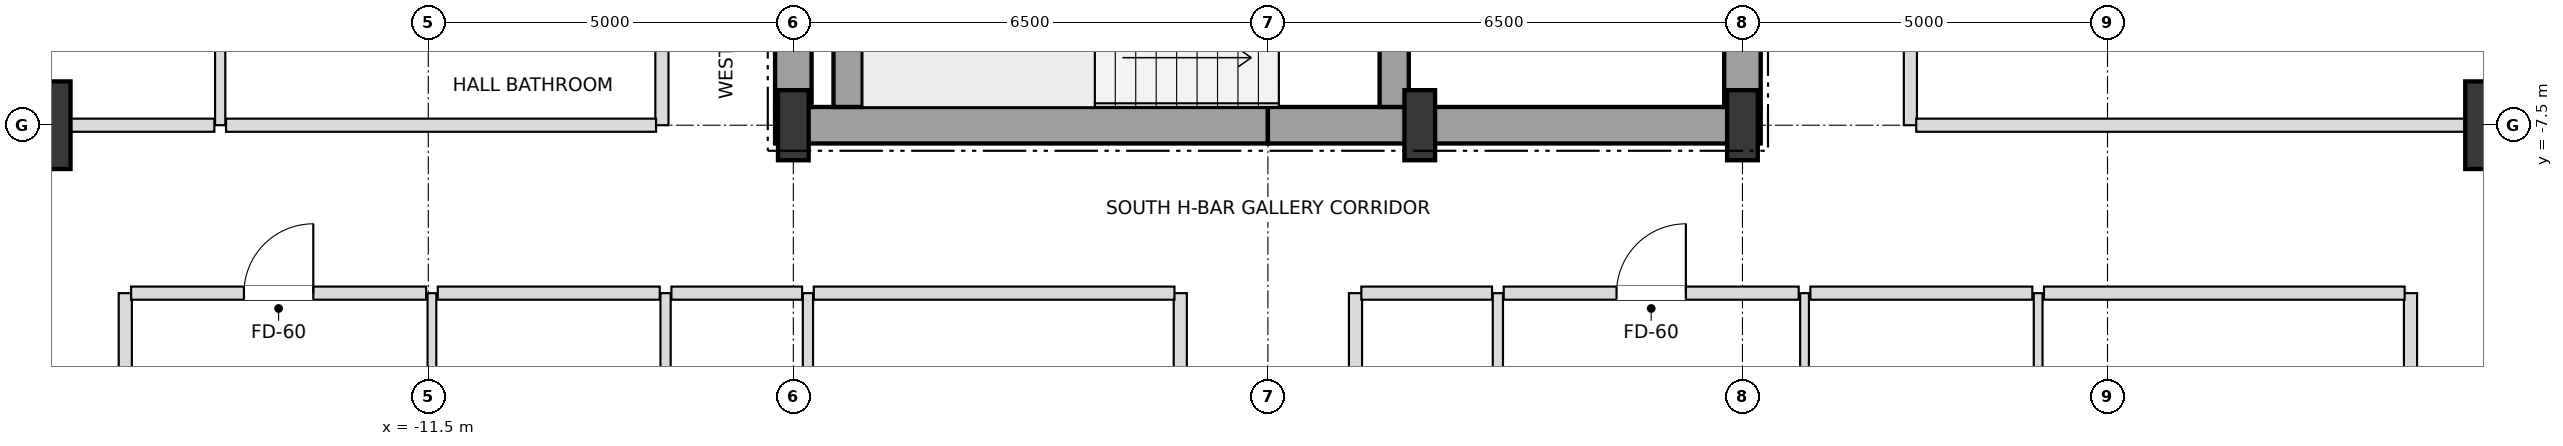
"""IFC4 building model, lengths in metres.
Left out: names, types, materials, properties, quantities, classifications, styles, units other than length and angle.
Written with IfcOpenShell. Run it as: python <this file> out.ifc"""

import sys

from ifc_helpers import new_model, si_unit, direction, frame, frame_2d, origin, origin_2d, place, context, subcontext, project, spatial, rectangle, i_section, extrude, element, fill, save


model = new_model("IFC4")
c1 = context("Model", 3, precision=1e-05, world=origin(), true_north=direction((0.0, 1.0)))
c2 = subcontext(c1, "Body", "Model", "MODEL_VIEW")
j1 = project(units=[si_unit("LENGTHUNIT", "METRE"), si_unit("PLANEANGLEUNIT", "RADIAN")], contexts=[c1])
p1 = place(None, origin())
s1 = spatial("IfcSite", under=j1, at=p1, CompositionType="ELEMENT")
p2 = place(p1, origin())
s2 = spatial("IfcBuilding", under=s1, at=p2, CompositionType="ELEMENT")
p3 = place(p2, frame((0.0, 0.0, 140.4)))
s3 = spatial("IfcBuildingStorey", under=s2, at=p3, CompositionType="ELEMENT", Elevation=140.4)
for number, where, z_axis, x_axis in (
    (1, (-6.5, -7.5, 0.0), (0.0, 0.0, 1.0), (1.0, 0.0, 0.0)),
    (2, (2.08, -7.5, 0.0), (0.0, 0.0, 1.0), (1.0, 0.0, 0.0)),
    (3, (6.5, -7.5, 0.0), (0.0, 0.0, 1.0), (1.0, 0.0, 0.0)),
):
    element("IfcColumn", number, at=place(p3, frame(where, z_axis=z_axis, x_axis=x_axis)), inside=s3, PredefinedType="COLUMN", context=c2, shape_type="SweptSolid", body=[
        extrude(i_section(OverallWidth=0.42, OverallDepth=0.96, WebThickness=0.022, FlangeThickness=0.034, at=origin_2d()), origin(), (0.0, 0.0, 1.0), 3.6),
    ])
for number, where, z_axis, x_axis in (
    (4, (17.0, -7.5, 0.0), (0.0, 0.0, 1.0), (1.0, 0.0, 0.0)),
    (5, (-17.0, -7.5, 0.0), (0.0, 0.0, 1.0), (1.0, 0.0, 0.0)),
):
    element("IfcColumn", number, at=place(p3, frame(where, z_axis=z_axis, x_axis=x_axis)), inside=s3, PredefinedType="USERDEFINED", context=c2, shape_type="SweptSolid", body=[
        extrude(rectangle(XDim=1.2, YDim=1.2, at=origin_2d()), origin(), (0.0, 0.0, 1.0), 3.6),
    ])
for number, where, z_axis, x_axis in (
    (6, (-6.75, -7.5, 0.0), (0.0, 0.0, 1.0), (1.0, 0.0, 0.0)),
    (7, (0.0, -7.5, 0.0), (0.0, 0.0, 1.0), (1.0, 0.0, 0.0)),
):
    element("IfcWall", number, at=place(p3, frame(where, z_axis=z_axis, x_axis=x_axis)), inside=s3, PredefinedType="SHEAR", context=c2, shape_type="SweptSolid", body=[
        extrude(rectangle(XDim=6.75, YDim=0.5, at=frame_2d((3.375, 0.0))), origin(), (0.0, 0.0, 1.0), 3.38),
    ])
p4 = place(p3, frame((-6.5, -7.25, 0.0), z_axis=(0.0, 0.0, 1.0), x_axis=(0.0, 1.0, 0.0)))
e8 = element("IfcWall", 8, at=p4, inside=s3, PredefinedType="SHEAR", context=c2, shape_type="SweptSolid", body=[
    extrude(rectangle(XDim=3.55, YDim=0.5, at=frame_2d((1.775, 0.0))), origin(), (0.0, 0.0, 1.0), 3.38),
])
p5 = place(p3, frame((6.5, -7.25, 0.0), z_axis=(0.0, 0.0, 1.0), x_axis=(0.0, 1.0, 0.0)))
e9 = element("IfcWall", 9, at=p5, inside=s3, PredefinedType="SHEAR", context=c2, shape_type="SweptSolid", body=[
    extrude(rectangle(XDim=5.75, YDim=0.5, at=frame_2d((2.875, 0.0))), origin(), (0.0, 0.0, 1.0), 3.38),
])
p6 = place(p5, frame((0.85, 0.0, 0.0)))
e10 = element("IfcOpeningElement", 10, at=p6, cuts=e9, PredefinedType="OPENING", context=c2, shape_type="SweptSolid", body=[
    extrude(rectangle(XDim=1.05, YDim=2.15, at=frame_2d((0.525, 1.075))), frame((0.0, 0.26, 0.0), z_axis=(0.0, -1.0, 0.0), x_axis=(1.0, 0.0, 0.0)), (0.0, 0.0, 1.0), 0.52),
])
p7 = place(p3, frame((-5.75, -7.25, 0.0), z_axis=(0.0, 0.0, 1.0), x_axis=(0.0, 1.0, 0.0)))
e11 = element("IfcWall", 11, at=p7, inside=s3, PredefinedType="SHEAR", context=c2, shape_type="SweptSolid", body=[
    extrude(rectangle(XDim=2.9, YDim=0.4, at=frame_2d((1.45, 0.0))), origin(), (0.0, 0.0, 1.0), 3.38),
])
p8 = place(p3, frame((1.73, -7.25, 0.0), z_axis=(0.0, 0.0, 1.0), x_axis=(0.0, 1.0, 0.0)))
e12 = element("IfcWall", 12, at=p8, inside=s3, PredefinedType="SHEAR", context=c2, shape_type="SweptSolid", body=[
    extrude(rectangle(XDim=3.3, YDim=0.4, at=frame_2d((1.65, 0.0))), origin(), (0.0, 0.0, 1.0), 3.38),
])
p9 = place(p8, frame((0.9, 0.0, 0.0)))
e13 = element("IfcOpeningElement", 13, at=p9, cuts=e12, PredefinedType="OPENING", context=c2, shape_type="SweptSolid", body=[
    extrude(rectangle(XDim=1.05, YDim=2.15, at=frame_2d((0.525, 1.075))), frame((0.0, 0.21, 0.0), z_axis=(0.0, -1.0, 0.0), x_axis=(1.0, 0.0, 0.0)), (0.0, 0.0, 1.0), 0.42),
])
p10 = place(p3, frame((-15.65, -17.15, 0.0), z_axis=(0.0, 0.0, 1.0), x_axis=(0.0, 1.0, 0.0)))
e14 = element("IfcWall", 14, at=p10, inside=s3, PredefinedType="PARTITIONING", context=c2, shape_type="SweptSolid", body=[
    extrude(rectangle(XDim=7.35, YDim=0.18, at=frame_2d((3.675, 0.0))), origin(), (0.0, 0.0, 1.0), 2.736),
])
p11 = place(p3, frame((-14.35, -7.5, 0.0), z_axis=(0.0, 0.0, 1.0), x_axis=(0.0, 1.0, 0.0)))
e15 = element("IfcWall", 15, at=p11, inside=s3, PredefinedType="PARTITIONING", context=c2, shape_type="SweptSolid", body=[
    extrude(rectangle(XDim=15.0, YDim=0.14, at=frame_2d((7.5, 0.0))), origin(), (0.0, 0.0, 1.0), 3.38),
])
p12 = place(p11, frame((3.475, 0.0, 0.0)))
e16 = element("IfcOpeningElement", 16, at=p12, cuts=e15, PredefinedType="OPENING", context=c2, shape_type="SweptSolid", body=[
    extrude(rectangle(XDim=0.95, YDim=2.1, at=frame_2d((0.475, 1.05))), frame((0.0, 0.08, 0.0), z_axis=(0.0, -1.0, 0.0), x_axis=(1.0, 0.0, 0.0)), (0.0, 0.0, 1.0), 0.16),
])
p13 = place(p3, frame((-11.45, -17.15, 0.0), z_axis=(0.0, 0.0, 1.0), x_axis=(0.0, 1.0, 0.0)))
e17 = element("IfcWall", 17, at=p13, inside=s3, PredefinedType="PARTITIONING", context=c2, shape_type="SweptSolid", body=[
    extrude(rectangle(XDim=7.35, YDim=0.12, at=frame_2d((3.675, 0.0))), origin(), (0.0, 0.0, 1.0), 2.736),
])
p14 = place(p13, frame((2.687, 0.0, 0.0)))
e18 = element("IfcOpeningElement", 18, at=p14, cuts=e17, PredefinedType="OPENING", context=c2, shape_type="SweptSolid", body=[
    extrude(rectangle(XDim=0.95, YDim=2.1, at=frame_2d((0.475, 1.05))), frame((0.0, 0.07, 0.0), z_axis=(0.0, -1.0, 0.0), x_axis=(1.0, 0.0, 0.0)), (0.0, 0.0, 1.0), 0.14),
])
p15 = place(p3, frame((-8.3, -7.5, 0.0), z_axis=(0.0, 0.0, 1.0), x_axis=(0.0, 1.0, 0.0)))
e19 = element("IfcWall", 19, at=p15, inside=s3, PredefinedType="PARTITIONING", context=c2, shape_type="SweptSolid", body=[
    extrude(rectangle(XDim=15.0, YDim=0.18, at=frame_2d((7.5, 0.0))), origin(), (0.0, 0.0, 1.0), 3.38),
])
p16 = place(p15, frame((2.495, 0.0, 0.0)))
e20 = element("IfcOpeningElement", 20, at=p16, cuts=e19, PredefinedType="OPENING", context=c2, shape_type="SweptSolid", body=[
    extrude(rectangle(XDim=0.95, YDim=2.15, at=frame_2d((0.475, 1.075))), frame((0.0, 0.1, 0.0), z_axis=(0.0, -1.0, 0.0), x_axis=(1.0, 0.0, 0.0)), (0.0, 0.0, 1.0), 0.2),
])
p17 = place(p3, frame((-8.25, -17.15, 0.0), z_axis=(0.0, 0.0, 1.0), x_axis=(0.0, 1.0, 0.0)))
e21 = element("IfcWall", 21, at=p17, inside=s3, PredefinedType="PARTITIONING", context=c2, shape_type="SweptSolid", body=[
    extrude(rectangle(XDim=7.35, YDim=0.14, at=frame_2d((3.675, 0.0))), origin(), (0.0, 0.0, 1.0), 2.816),
])
p18 = place(p17, frame((3.23, 0.0, 0.0)))
e22 = element("IfcOpeningElement", 22, at=p18, cuts=e21, PredefinedType="OPENING", context=c2, shape_type="SweptSolid", body=[
    extrude(rectangle(XDim=0.9, YDim=2.1, at=frame_2d((0.45, 1.05))), frame((0.0, 0.08, 0.0), z_axis=(0.0, -1.0, 0.0), x_axis=(1.0, 0.0, 0.0)), (0.0, 0.0, 1.0), 0.16),
])
p19 = place(p3, frame((-6.3, -23.15, 0.0), z_axis=(0.0, 0.0, 1.0), x_axis=(0.0, 1.0, 0.0)))
e23 = element("IfcWall", 23, at=p19, inside=s3, PredefinedType="PARTITIONING", context=c2, shape_type="SweptSolid", body=[
    extrude(rectangle(XDim=13.35, YDim=0.14, at=frame_2d((6.675, 0.0))), origin(), (0.0, 0.0, 1.0), 2.816),
])
p20 = place(p19, frame((1.399, 0.0, 0.0)))
e24 = element("IfcOpeningElement", 24, at=p20, cuts=e23, PredefinedType="OPENING", context=c2, shape_type="SweptSolid", body=[
    extrude(rectangle(XDim=0.9, YDim=2.1, at=frame_2d((0.45, 1.05))), frame((0.0, 0.08, 0.0), z_axis=(0.0, -1.0, 0.0), x_axis=(1.0, 0.0, 0.0)), (0.0, 0.0, 1.0), 0.16),
])
for number, where, z_axis, x_axis in (
    (25, (-1.2, -23.15, 0.0), (0.0, 0.0, 1.0), (0.0, 1.0, 0.0)),
    (26, (1.2, -23.15, 0.0), (0.0, 0.0, 1.0), (0.0, 1.0, 0.0)),
):
    element("IfcWall", number, at=place(p3, frame(where, z_axis=z_axis, x_axis=x_axis)), inside=s3, PredefinedType="PARTITIONING", context=c2, shape_type="SweptSolid", body=[
        extrude(rectangle(XDim=13.35, YDim=0.18, at=frame_2d((6.675, 0.0))), origin(), (0.0, 0.0, 1.0), 2.816),
    ])
p21 = place(p3, frame((3.15, -17.15, 0.0), z_axis=(0.0, 0.0, 1.0), x_axis=(0.0, 1.0, 0.0)))
e27 = element("IfcWall", 27, at=p21, inside=s3, PredefinedType="PARTITIONING", context=c2, shape_type="SweptSolid", body=[
    extrude(rectangle(XDim=7.35, YDim=0.14, at=frame_2d((3.675, 0.0))), origin(), (0.0, 0.0, 1.0), 3.38),
])
p22 = place(p21, frame((3.23, 0.0, 0.0)))
e28 = element("IfcOpeningElement", 28, at=p22, cuts=e27, PredefinedType="OPENING", context=c2, shape_type="SweptSolid", body=[
    extrude(rectangle(XDim=0.9, YDim=2.1, at=frame_2d((0.45, 1.05))), frame((0.0, 0.08, 0.0), z_axis=(0.0, -1.0, 0.0), x_axis=(1.0, 0.0, 0.0)), (0.0, 0.0, 1.0), 0.16),
])
p23 = place(p3, frame((7.35, -23.15, 0.0), z_axis=(0.0, 0.0, 1.0), x_axis=(0.0, 1.0, 0.0)))
e29 = element("IfcWall", 29, at=p23, inside=s3, PredefinedType="PARTITIONING", context=c2, shape_type="SweptSolid", body=[
    extrude(rectangle(XDim=13.35, YDim=0.12, at=frame_2d((6.675, 0.0))), origin(), (0.0, 0.0, 1.0), 2.816),
])
p24 = place(p23, frame((9.205, 0.0, 0.0)))
e30 = element("IfcOpeningElement", 30, at=p24, cuts=e29, PredefinedType="OPENING", context=c2, shape_type="SweptSolid", body=[
    extrude(rectangle(XDim=0.95, YDim=2.1, at=frame_2d((0.475, 1.05))), frame((0.0, 0.07, 0.0), z_axis=(0.0, -1.0, 0.0), x_axis=(1.0, 0.0, 0.0)), (0.0, 0.0, 1.0), 0.14),
])
p25 = place(p23, frame((1.399, 0.0, 0.0)))
e31 = element("IfcOpeningElement", 31, at=p25, cuts=e29, PredefinedType="OPENING", context=c2, shape_type="SweptSolid", body=[
    extrude(rectangle(XDim=0.9, YDim=2.1, at=frame_2d((0.45, 1.05))), frame((0.0, 0.07, 0.0), z_axis=(0.0, -1.0, 0.0), x_axis=(1.0, 0.0, 0.0)), (0.0, 0.0, 1.0), 0.14),
])
p26 = place(p3, frame((8.8, -7.5, 0.0), z_axis=(0.0, 0.0, 1.0), x_axis=(0.0, 1.0, 0.0)))
e32 = element("IfcWall", 32, at=p26, inside=s3, PredefinedType="PARTITIONING", context=c2, shape_type="SweptSolid", body=[
    extrude(rectangle(XDim=15.0, YDim=0.18, at=frame_2d((7.5, 0.0))), origin(), (0.0, 0.0, 1.0), 3.38),
])
p27 = place(p26, frame((2.075, 0.0, 0.0)))
e33 = element("IfcOpeningElement", 33, at=p27, cuts=e32, PredefinedType="OPENING", context=c2, shape_type="SweptSolid", body=[
    extrude(rectangle(XDim=0.95, YDim=2.15, at=frame_2d((0.475, 1.075))), frame((0.0, 0.1, 0.0), z_axis=(0.0, -1.0, 0.0), x_axis=(1.0, 0.0, 0.0)), (0.0, 0.0, 1.0), 0.2),
])
p28 = place(p26, frame((8.475, 0.0, 0.0)))
e34 = element("IfcOpeningElement", 34, at=p28, cuts=e32, PredefinedType="OPENING", context=c2, shape_type="SweptSolid", body=[
    extrude(rectangle(XDim=0.95, YDim=2.15, at=frame_2d((0.475, 1.075))), frame((0.0, 0.1, 0.0), z_axis=(0.0, -1.0, 0.0), x_axis=(1.0, 0.0, 0.0)), (0.0, 0.0, 1.0), 0.2),
])
p29 = place(p26, frame((13.425, 0.0, 0.0)))
e35 = element("IfcOpeningElement", 35, at=p29, cuts=e32, PredefinedType="OPENING", context=c2, shape_type="SweptSolid", body=[
    extrude(rectangle(XDim=0.95, YDim=2.15, at=frame_2d((0.475, 1.075))), frame((0.0, 0.1, 0.0), z_axis=(0.0, -1.0, 0.0), x_axis=(1.0, 0.0, 0.0)), (0.0, 0.0, 1.0), 0.2),
])
p30 = place(p3, frame((10.55, -23.15, 0.0), z_axis=(0.0, 0.0, 1.0), x_axis=(0.0, 1.0, 0.0)))
e36 = element("IfcWall", 36, at=p30, inside=s3, PredefinedType="PARTITIONING", context=c2, shape_type="SweptSolid", body=[
    extrude(rectangle(XDim=13.35, YDim=0.12, at=frame_2d((6.675, 0.0))), origin(), (0.0, 0.0, 1.0), 2.816),
])
p31 = place(p30, frame((8.687, 0.0, 0.0)))
e37 = element("IfcOpeningElement", 37, at=p31, cuts=e36, PredefinedType="OPENING", context=c2, shape_type="SweptSolid", body=[
    extrude(rectangle(XDim=0.95, YDim=2.1, at=frame_2d((0.475, 1.05))), frame((0.0, 0.07, 0.0), z_axis=(0.0, -1.0, 0.0), x_axis=(1.0, 0.0, 0.0)), (0.0, 0.0, 1.0), 0.14),
])
p32 = place(p30, frame((1.399, 0.0, 0.0)))
e38 = element("IfcOpeningElement", 38, at=p32, cuts=e36, PredefinedType="OPENING", context=c2, shape_type="SweptSolid", body=[
    extrude(rectangle(XDim=0.9, YDim=2.1, at=frame_2d((0.45, 1.05))), frame((0.0, 0.07, 0.0), z_axis=(0.0, -1.0, 0.0), x_axis=(1.0, 0.0, 0.0)), (0.0, 0.0, 1.0), 0.14),
])
p33 = place(p3, frame((15.65, -17.15, 0.0), z_axis=(0.0, 0.0, 1.0), x_axis=(0.0, 1.0, 0.0)))
e39 = element("IfcWall", 39, at=p33, inside=s3, PredefinedType="PARTITIONING", context=c2, shape_type="SweptSolid", body=[
    extrude(rectangle(XDim=7.35, YDim=0.18, at=frame_2d((3.675, 0.0))), origin(), (0.0, 0.0, 1.0), 2.736),
])
p34 = place(p3, frame((-15.57, -9.8, 0.0), z_axis=(0.0, 0.0, 1.0), x_axis=(1.0, 0.0, 0.0)))
e40 = element("IfcWall", 40, at=p34, inside=s3, PredefinedType="PARTITIONING", context=c2, shape_type="SweptSolid", body=[
    extrude(rectangle(XDim=4.04, YDim=0.18, at=frame_2d((2.02, 0.0))), origin(), (0.0, 0.0, 1.0), 3.38),
])
p35 = place(p34, frame((1.545, 0.0, 0.0)))
e41 = element("IfcOpeningElement", 41, at=p35, cuts=e40, PredefinedType="OPENING", context=c2, shape_type="SweptSolid", body=[
    extrude(rectangle(XDim=0.95, YDim=2.15, at=frame_2d((0.475, 1.075))), frame((0.0, 0.1, 0.0), z_axis=(0.0, -1.0, 0.0), x_axis=(1.0, 0.0, 0.0)), (0.0, 0.0, 1.0), 0.2),
])
p36 = place(p3, frame((-11.37, -9.8, 0.0), z_axis=(0.0, 0.0, 1.0), x_axis=(1.0, 0.0, 0.0)))
e42 = element("IfcWall", 42, at=p36, inside=s3, PredefinedType="PARTITIONING", context=c2, shape_type="SweptSolid", body=[
    extrude(rectangle(XDim=3.04, YDim=0.18, at=frame_2d((1.52, 0.0))), origin(), (0.0, 0.0, 1.0), 3.38),
])
p37 = place(p3, frame((-8.17, -9.8, 0.0), z_axis=(0.0, 0.0, 1.0), x_axis=(1.0, 0.0, 0.0)))
e43 = element("IfcWall", 43, at=p37, inside=s3, PredefinedType="PARTITIONING", context=c2, shape_type="SweptSolid", body=[
    extrude(rectangle(XDim=1.79, YDim=0.18, at=frame_2d((0.895, 0.0))), origin(), (0.0, 0.0, 1.0), 2.816),
])
p38 = place(p3, frame((-6.22, -9.8, 0.0), z_axis=(0.0, 0.0, 1.0), x_axis=(1.0, 0.0, 0.0)))
e44 = element("IfcWall", 44, at=p38, inside=s3, PredefinedType="PARTITIONING", context=c2, shape_type="SweptSolid", body=[
    extrude(rectangle(XDim=4.94, YDim=0.18, at=frame_2d((2.47, 0.0))), origin(), (0.0, 0.0, 1.0), 3.38),
])
p39 = place(p3, frame((1.28, -9.8, 0.0), z_axis=(0.0, 0.0, 1.0), x_axis=(1.0, 0.0, 0.0)))
e45 = element("IfcWall", 45, at=p39, inside=s3, PredefinedType="PARTITIONING", context=c2, shape_type="SweptSolid", body=[
    extrude(rectangle(XDim=1.79, YDim=0.18, at=frame_2d((0.895, 0.0))), origin(), (0.0, 0.0, 1.0), 3.38),
])
p40 = place(p3, frame((3.23, -9.8, 0.0), z_axis=(0.0, 0.0, 1.0), x_axis=(1.0, 0.0, 0.0)))
e46 = element("IfcWall", 46, at=p40, inside=s3, PredefinedType="PARTITIONING", context=c2, shape_type="SweptSolid", body=[
    extrude(rectangle(XDim=4.04, YDim=0.18, at=frame_2d((2.02, 0.0))), origin(), (0.0, 0.0, 1.0), 2.816),
])
p41 = place(p40, frame((1.545, 0.0, 0.0)))
e47 = element("IfcOpeningElement", 47, at=p41, cuts=e46, PredefinedType="OPENING", context=c2, shape_type="SweptSolid", body=[
    extrude(rectangle(XDim=0.95, YDim=2.15, at=frame_2d((0.475, 1.075))), frame((0.0, 0.1, 0.0), z_axis=(0.0, -1.0, 0.0), x_axis=(1.0, 0.0, 0.0)), (0.0, 0.0, 1.0), 0.2),
])
p42 = place(p3, frame((7.43, -9.8, 0.0), z_axis=(0.0, 0.0, 1.0), x_axis=(1.0, 0.0, 0.0)))
e48 = element("IfcWall", 48, at=p42, inside=s3, PredefinedType="PARTITIONING", context=c2, shape_type="SweptSolid", body=[
    extrude(rectangle(XDim=3.04, YDim=0.18, at=frame_2d((1.52, 0.0))), origin(), (0.0, 0.0, 1.0), 3.38),
])
p43 = place(p3, frame((10.63, -9.8, 0.0), z_axis=(0.0, 0.0, 1.0), x_axis=(1.0, 0.0, 0.0)))
e49 = element("IfcWall", 49, at=p43, inside=s3, PredefinedType="PARTITIONING", context=c2, shape_type="SweptSolid", body=[
    extrude(rectangle(XDim=4.94, YDim=0.18, at=frame_2d((2.47, 0.0))), origin(), (0.0, 0.0, 1.0), 3.38),
])
p44 = place(p3, frame((-20.15, -7.5, 0.0), z_axis=(0.0, 0.0, 1.0), x_axis=(1.0, 0.0, 0.0)))
e50 = element("IfcWall", 50, at=p44, inside=s3, PredefinedType="PARTITIONING", context=c2, shape_type="SweptSolid", body=[
    extrude(rectangle(XDim=5.72, YDim=0.18, at=frame_2d((2.86, 0.0))), origin(), (0.0, 0.0, 1.0), 2.816),
])
p45 = place(p3, frame((-14.27, -7.5, 0.0), z_axis=(0.0, 0.0, 1.0), x_axis=(1.0, 0.0, 0.0)))
e51 = element("IfcWall", 51, at=p45, inside=s3, PredefinedType="PARTITIONING", context=c2, shape_type="SweptSolid", body=[
    extrude(rectangle(XDim=5.89, YDim=0.18, at=frame_2d((2.945, 0.0))), origin(), (0.0, 0.0, 1.0), 2.816),
])
p46 = place(p3, frame((8.88, -7.5, 0.0), z_axis=(0.0, 0.0, 1.0), x_axis=(1.0, 0.0, 0.0)))
e52 = element("IfcWall", 52, at=p46, inside=s3, PredefinedType="PARTITIONING", context=c2, shape_type="SweptSolid", body=[
    extrude(rectangle(XDim=11.27, YDim=0.18, at=frame_2d((5.635, 0.0))), origin(), (0.0, 0.0, 1.0), 2.816),
])
p47 = place(p35, origin())
e53 = element("IfcDoor", 53, at=p47, inside=s3, OperationType="SINGLE_SWING_RIGHT", PredefinedType="DOOR", context=c2, shape_type="SweptSolid", body=[
    extrude(rectangle(XDim=0.95, YDim=2.15, at=frame_2d((0.475, 1.075))), frame((0.0, 0.025, 0.0), z_axis=(0.0, -1.0, 0.0), x_axis=(1.0, 0.0, 0.0)), (0.0, 0.0, 1.0), 0.05),
])
fill(e41, e53)
p48 = place(p41, origin())
e54 = element("IfcDoor", 54, at=p48, inside=s3, OperationType="SINGLE_SWING_RIGHT", PredefinedType="DOOR", context=c2, shape_type="SweptSolid", body=[
    extrude(rectangle(XDim=0.95, YDim=2.15, at=frame_2d((0.475, 1.075))), frame((0.0, 0.025, 0.0), z_axis=(0.0, -1.0, 0.0), x_axis=(1.0, 0.0, 0.0)), (0.0, 0.0, 1.0), 0.05),
])
fill(e47, e54)
save(model, sys.argv[1])
